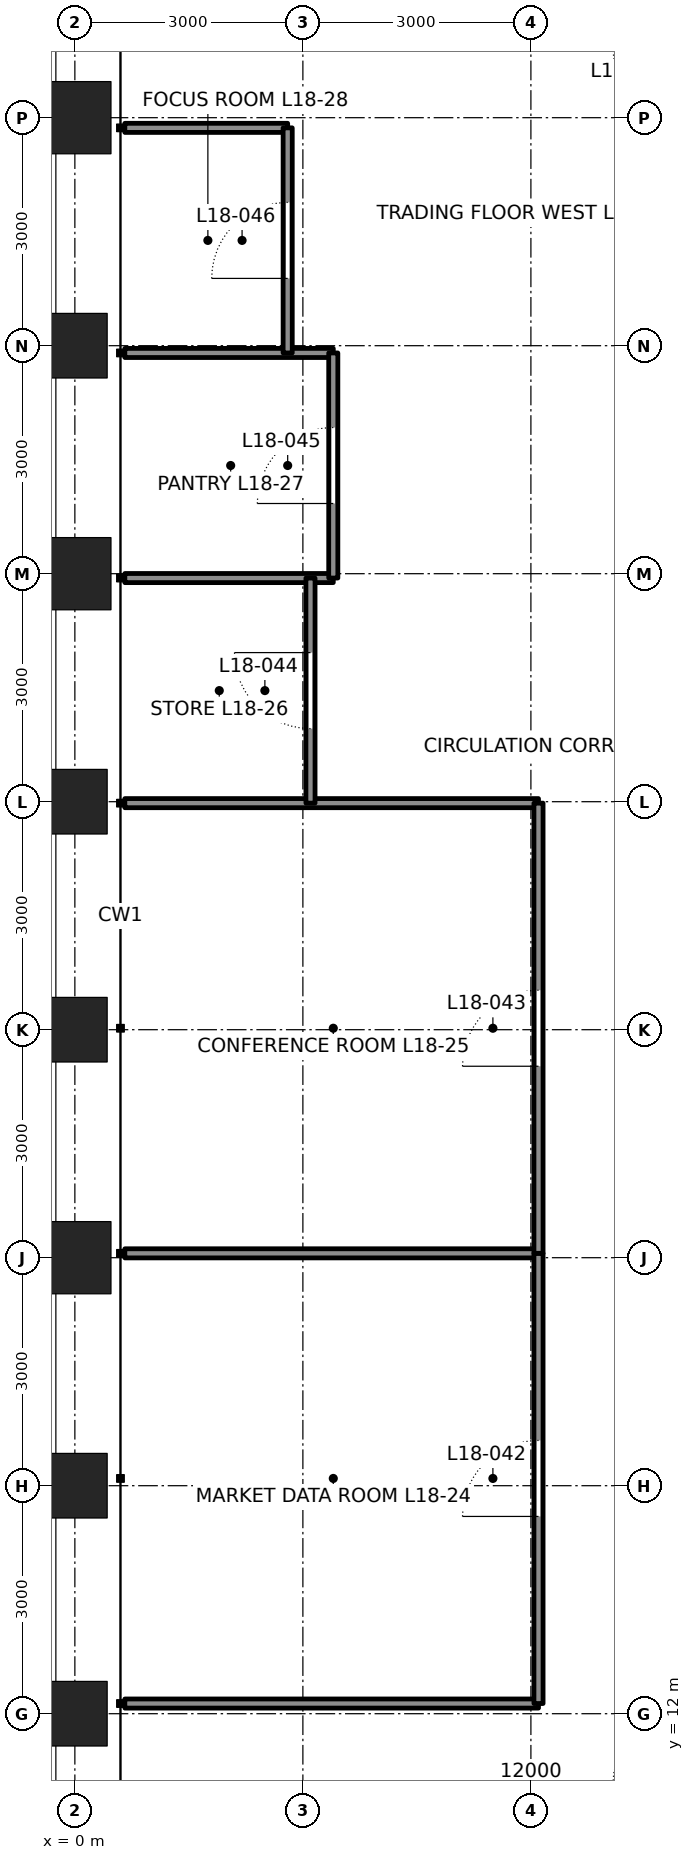
"""IFC4 building model, lengths in metres.
Left out: names, types, materials, properties, quantities, classifications, styles, units other than length and angle.
Written with IfcOpenShell. Run it as: python <this file> out.ifc"""

import sys

from ifc_helpers import new_model, si_unit, direction, frame, frame_2d, origin, origin_2d, place, context, subcontext, project, spatial, rectangle, hollow_rectangle, extrude, element, fill, save


model = new_model("IFC4")
c1 = context("Model", 3, precision=1e-05, world=origin(), true_north=direction((0.0, 1.0)))
c2 = subcontext(c1, "Body", "Model", "MODEL_VIEW")
j1 = project(units=[si_unit("LENGTHUNIT", "METRE"), si_unit("PLANEANGLEUNIT", "RADIAN")], contexts=[c1])
p1 = place(None, origin())
s1 = spatial("IfcSite", under=j1, at=p1, CompositionType="ELEMENT")
p2 = place(p1, origin())
s2 = spatial("IfcBuilding", under=s1, at=p2, CompositionType="ELEMENT")
p3 = place(p2, frame((0.0, 0.0, 87.3)))
s3 = spatial("IfcBuildingStorey", under=s2, at=p3, CompositionType="ELEMENT", Elevation=87.3)
p4 = place(p3, frame((0.0, 33.0, 0.0), z_axis=(0.0, 0.0, 1.0), x_axis=(-1.0, 0.0, 0.0)))
e1 = element("IfcColumn", 1, at=p4, inside=s3, PredefinedType="COLUMN", context=c2, shape_type="SweptSolid", body=[
    extrude(hollow_rectangle(XDim=0.95, YDim=0.95, WallThickness=0.11, at=origin_2d()), origin(), (0.0, 0.0, 1.0), 4.5),
])
p5 = place(p3, frame((0.0, 30.0, 0.0), z_axis=(0.0, 0.0, 1.0), x_axis=(-1.0, 0.0, 0.0)))
e2 = element("IfcColumn", 2, at=p5, inside=s3, PredefinedType="COLUMN", context=c2, shape_type="SweptSolid", body=[
    extrude(hollow_rectangle(XDim=0.85, YDim=0.85, WallThickness=0.085, at=origin_2d()), origin(), (0.0, 0.0, 1.0), 4.5),
])
p6 = place(p3, frame((0.0, 27.0, 0.0), z_axis=(0.0, 0.0, 1.0), x_axis=(-1.0, 0.0, 0.0)))
e3 = element("IfcColumn", 3, at=p6, inside=s3, PredefinedType="COLUMN", context=c2, shape_type="SweptSolid", body=[
    extrude(hollow_rectangle(XDim=0.95, YDim=0.95, WallThickness=0.11, at=origin_2d()), origin(), (0.0, 0.0, 1.0), 4.5),
])
for number, where, z_axis, x_axis in (
    (4, (0.0, 24.0, 0.0), (0.0, 0.0, 1.0), (-1.0, 0.0, 0.0)),
    (5, (0.0, 21.0, 0.0), (0.0, 0.0, 1.0), (-1.0, 0.0, 0.0)),
):
    element("IfcColumn", number, at=place(p3, frame(where, z_axis=z_axis, x_axis=x_axis)), inside=s3, PredefinedType="COLUMN", context=c2, shape_type="SweptSolid", body=[
        extrude(hollow_rectangle(XDim=0.85, YDim=0.85, WallThickness=0.085, at=origin_2d()), origin(), (0.0, 0.0, 1.0), 4.5),
    ])
p7 = place(p3, frame((0.0, 18.0, 0.0), z_axis=(0.0, 0.0, 1.0), x_axis=(-1.0, 0.0, 0.0)))
e6 = element("IfcColumn", 6, at=p7, inside=s3, PredefinedType="COLUMN", context=c2, shape_type="SweptSolid", body=[
    extrude(hollow_rectangle(XDim=0.95, YDim=0.95, WallThickness=0.11, at=origin_2d()), origin(), (0.0, 0.0, 1.0), 4.5),
])
for number, where, z_axis, x_axis in (
    (7, (0.0, 15.0, 0.0), (0.0, 0.0, 1.0), (-1.0, 0.0, 0.0)),
    (8, (0.0, 12.0, 0.0), (0.0, 0.0, 1.0), (-1.0, 0.0, 0.0)),
):
    element("IfcColumn", number, at=place(p3, frame(where, z_axis=z_axis, x_axis=x_axis)), inside=s3, PredefinedType="COLUMN", context=c2, shape_type="SweptSolid", body=[
        extrude(hollow_rectangle(XDim=0.85, YDim=0.85, WallThickness=0.085, at=origin_2d()), origin(), (0.0, 0.0, 1.0), 4.5),
    ])
p8 = place(p3, frame((0.657, 12.134, -0.3), z_axis=(0.0, 0.0, 1.0), x_axis=(1.0, 0.0, 0.0)))
e9 = element("IfcWall", 9, at=p8, inside=s3, PredefinedType="PARTITIONING", context=c2, shape_type="SweptSolid", body=[
    extrude(rectangle(XDim=5.443, YDim=0.12, at=frame_2d((2.721, 0.0))), origin(), (0.0, 0.0, 1.0), 3.481),
])
for number, where, z_axis, x_axis in (
    (10, (0.657, 18.057, -0.3), (0.0, 0.0, 1.0), (1.0, 0.0, 0.0)),
    (11, (0.657, 23.981, -0.3), (0.0, 0.0, 1.0), (1.0, 0.0, 0.0)),
):
    element("IfcWall", number, at=place(p3, frame(where, z_axis=z_axis, x_axis=x_axis)), inside=s3, PredefinedType="PARTITIONING", context=c2, shape_type="SweptSolid", body=[
        extrude(rectangle(XDim=5.443, YDim=0.12, at=frame_2d((2.721, 0.0))), origin(), (0.0, 0.0, 1.0), 3.646),
    ])
for number, where, z_axis, x_axis in (
    (12, (0.657, 26.943, -0.3), (0.0, 0.0, 1.0), (1.0, 0.0, 0.0)),
    (13, (0.657, 29.904, -0.3), (0.0, 0.0, 1.0), (1.0, 0.0, 0.0)),
):
    element("IfcWall", number, at=place(p3, frame(where, z_axis=z_axis, x_axis=x_axis)), inside=s3, PredefinedType="PARTITIONING", context=c2, shape_type="SweptSolid", body=[
        extrude(rectangle(XDim=2.742, YDim=0.12, at=frame_2d((1.371, 0.0))), origin(), (0.0, 0.0, 1.0), 3.646),
    ])
p9 = place(p3, frame((0.657, 32.866, -0.3), z_axis=(0.0, 0.0, 1.0), x_axis=(1.0, 0.0, 0.0)))
e14 = element("IfcWall", 14, at=p9, inside=s3, PredefinedType="PARTITIONING", context=c2, shape_type="SweptSolid", body=[
    extrude(rectangle(XDim=2.143, YDim=0.12, at=frame_2d((1.071, 0.0))), origin(), (0.0, 0.0, 1.0), 3.481),
])
p10 = place(p3, frame((6.1, 12.134, -0.3), z_axis=(0.0, 0.0, 1.0), x_axis=(0.0, 1.0, 0.0)))
e15 = element("IfcWall", 15, at=p10, inside=s3, PredefinedType="PARTITIONING", context=c2, shape_type="SweptSolid", body=[
    extrude(rectangle(XDim=5.924, YDim=0.12, at=frame_2d((2.962, 0.0))), origin(), (0.0, 0.0, 1.0), 4.34),
])
p11 = place(p10, frame((2.462, 0.0, 0.3)))
e16 = element("IfcOpeningElement", 16, at=p11, cuts=e15, PredefinedType="OPENING", context=c2, shape_type="SweptSolid", body=[
    extrude(rectangle(XDim=1.0, YDim=2.4, at=frame_2d((0.5, 1.2))), frame((0.0, 0.07, 0.0), z_axis=(0.0, -1.0, 0.0), x_axis=(1.0, 0.0, 0.0)), (0.0, 0.0, 1.0), 0.14),
])
p12 = place(p3, frame((6.1, 18.057, -0.3), z_axis=(0.0, 0.0, 1.0), x_axis=(0.0, 1.0, 0.0)))
e17 = element("IfcWall", 17, at=p12, inside=s3, PredefinedType="PARTITIONING", context=c2, shape_type="SweptSolid", body=[
    extrude(rectangle(XDim=5.924, YDim=0.12, at=frame_2d((2.962, 0.0))), origin(), (0.0, 0.0, 1.0), 4.34),
])
p13 = place(p12, frame((2.462, 0.0, 0.3)))
e18 = element("IfcOpeningElement", 18, at=p13, cuts=e17, PredefinedType="OPENING", context=c2, shape_type="SweptSolid", body=[
    extrude(rectangle(XDim=1.0, YDim=2.4, at=frame_2d((0.5, 1.2))), frame((0.0, 0.07, 0.0), z_axis=(0.0, -1.0, 0.0), x_axis=(1.0, 0.0, 0.0)), (0.0, 0.0, 1.0), 0.14),
])
p14 = place(p3, frame((3.1, 23.981, -0.3), z_axis=(0.0, 0.0, 1.0), x_axis=(0.0, 1.0, 0.0)))
e19 = element("IfcWall", 19, at=p14, inside=s3, PredefinedType="PARTITIONING", context=c2, shape_type="SweptSolid", body=[
    extrude(rectangle(XDim=2.962, YDim=0.12, at=frame_2d((1.481, 0.0))), origin(), (0.0, 0.0, 1.0), 4.34),
])
p15 = place(p14, frame((0.981, 0.0, 0.3)))
e20 = element("IfcOpeningElement", 20, at=p15, cuts=e19, PredefinedType="OPENING", context=c2, shape_type="SweptSolid", body=[
    extrude(rectangle(XDim=1.0, YDim=2.4, at=frame_2d((0.5, 1.2))), frame((0.0, 0.07, 0.0), z_axis=(0.0, -1.0, 0.0), x_axis=(1.0, 0.0, 0.0)), (0.0, 0.0, 1.0), 0.14),
])
p16 = place(p3, frame((3.4, 26.943, -0.3), z_axis=(0.0, 0.0, 1.0), x_axis=(0.0, 1.0, 0.0)))
e21 = element("IfcWall", 21, at=p16, inside=s3, PredefinedType="PARTITIONING", context=c2, shape_type="SweptSolid", body=[
    extrude(rectangle(XDim=2.962, YDim=0.12, at=frame_2d((1.481, 0.0))), origin(), (0.0, 0.0, 1.0), 4.34),
])
p17 = place(p16, frame((0.981, 0.0, 0.3)))
e22 = element("IfcOpeningElement", 22, at=p17, cuts=e21, PredefinedType="OPENING", context=c2, shape_type="SweptSolid", body=[
    extrude(rectangle(XDim=1.0, YDim=2.4, at=frame_2d((0.5, 1.2))), frame((0.0, 0.07, 0.0), z_axis=(0.0, -1.0, 0.0), x_axis=(1.0, 0.0, 0.0)), (0.0, 0.0, 1.0), 0.14),
])
p18 = place(p3, frame((2.8, 29.904, -0.3), z_axis=(0.0, 0.0, 1.0), x_axis=(0.0, 1.0, 0.0)))
e23 = element("IfcWall", 23, at=p18, inside=s3, PredefinedType="PARTITIONING", context=c2, shape_type="SweptSolid", body=[
    extrude(rectangle(XDim=2.962, YDim=0.12, at=frame_2d((1.481, 0.0))), origin(), (0.0, 0.0, 1.0), 4.34),
])
p19 = place(p18, frame((0.981, 0.0, 0.3)))
e24 = element("IfcOpeningElement", 24, at=p19, cuts=e23, PredefinedType="OPENING", context=c2, shape_type="SweptSolid", body=[
    extrude(rectangle(XDim=1.0, YDim=2.4, at=frame_2d((0.5, 1.2))), frame((0.0, 0.07, 0.0), z_axis=(0.0, -1.0, 0.0), x_axis=(1.0, 0.0, 0.0)), (0.0, 0.0, 1.0), 0.14),
])
p20 = place(p3, frame((9.0, 33.0, -0.3), z_axis=(0.0, 0.0, 1.0), x_axis=(-0.707106781187, 0.707106781187, 0.0)))
e25 = element("IfcWall", 25, at=p20, inside=s3, PredefinedType="PARTITIONING", context=c2, shape_type="SweptSolid", body=[
    extrude(rectangle(XDim=11.842, YDim=0.12, at=frame_2d((5.921, 0.0))), origin(), (0.0, 0.0, 1.0), 4.34),
])
p21 = place(p20, frame((1.3, 0.0, 0.3)))
e26 = element("IfcOpeningElement", 26, at=p21, cuts=e25, PredefinedType="OPENING", context=c2, shape_type="SweptSolid", body=[
    extrude(rectangle(XDim=1.0, YDim=2.4, at=frame_2d((0.5, 1.2))), frame((0.0, 0.07, 0.0), z_axis=(0.0, -1.0, 0.0), x_axis=(1.0, 0.0, 0.0)), (0.0, 0.0, 1.0), 0.14),
])
p22 = place(p3, frame((9.0, 12.0, -0.3), z_axis=(0.0, 0.0, 1.0), x_axis=(-0.707106781187, -0.707106781187, 0.0)))
e27 = element("IfcWall", 27, at=p22, inside=s3, PredefinedType="PARTITIONING", context=c2, shape_type="SweptSolid", body=[
    extrude(rectangle(XDim=11.842, YDim=0.12, at=frame_2d((5.921, 0.0))), origin(), (0.0, 0.0, 1.0), 4.34),
])
p23 = place(p22, frame((1.3, 0.0, 0.3)))
e28 = element("IfcOpeningElement", 28, at=p23, cuts=e27, PredefinedType="OPENING", context=c2, shape_type="SweptSolid", body=[
    extrude(rectangle(XDim=1.0, YDim=2.4, at=frame_2d((0.5, 1.2))), frame((0.0, 0.07, 0.0), z_axis=(0.0, -1.0, 0.0), x_axis=(1.0, 0.0, 0.0)), (0.0, 0.0, 1.0), 0.14),
])
p24 = place(p11, origin())
e29 = element("IfcDoor", 29, at=p24, inside=s3, OperationType="SINGLE_SWING_LEFT", PredefinedType="DOOR", context=c2, shape_type="SweptSolid", body=[
    extrude(rectangle(XDim=1.0, YDim=2.4, at=frame_2d((0.5, 1.2))), frame((0.0, 0.025, 0.0), z_axis=(0.0, -1.0, 0.0), x_axis=(1.0, 0.0, 0.0)), (0.0, 0.0, 1.0), 0.05),
])
fill(e16, e29)
p25 = place(p13, origin())
e30 = element("IfcDoor", 30, at=p25, inside=s3, OperationType="SINGLE_SWING_LEFT", PredefinedType="DOOR", context=c2, shape_type="SweptSolid", body=[
    extrude(rectangle(XDim=1.0, YDim=2.4, at=frame_2d((0.5, 1.2))), frame((0.0, 0.025, 0.0), z_axis=(0.0, -1.0, 0.0), x_axis=(1.0, 0.0, 0.0)), (0.0, 0.0, 1.0), 0.05),
])
fill(e18, e30)
p26 = place(p15, origin())
e31 = element("IfcDoor", 31, at=p26, inside=s3, OperationType="SINGLE_SWING_RIGHT", PredefinedType="DOOR", context=c2, shape_type="SweptSolid", body=[
    extrude(rectangle(XDim=1.0, YDim=2.4, at=frame_2d((0.5, 1.2))), frame((0.0, 0.025, 0.0), z_axis=(0.0, -1.0, 0.0), x_axis=(1.0, 0.0, 0.0)), (0.0, 0.0, 1.0), 0.05),
])
fill(e20, e31)
p27 = place(p17, origin())
e32 = element("IfcDoor", 32, at=p27, inside=s3, OperationType="SINGLE_SWING_LEFT", PredefinedType="DOOR", context=c2, shape_type="SweptSolid", body=[
    extrude(rectangle(XDim=1.0, YDim=2.4, at=frame_2d((0.5, 1.2))), frame((0.0, 0.025, 0.0), z_axis=(0.0, -1.0, 0.0), x_axis=(1.0, 0.0, 0.0)), (0.0, 0.0, 1.0), 0.05),
])
fill(e22, e32)
p28 = place(p19, origin())
e33 = element("IfcDoor", 33, at=p28, inside=s3, OperationType="SINGLE_SWING_LEFT", PredefinedType="DOOR", context=c2, shape_type="SweptSolid", body=[
    extrude(rectangle(XDim=1.0, YDim=2.4, at=frame_2d((0.5, 1.2))), frame((0.0, 0.025, 0.0), z_axis=(0.0, -1.0, 0.0), x_axis=(1.0, 0.0, 0.0)), (0.0, 0.0, 1.0), 0.05),
])
fill(e24, e33)
save(model, sys.argv[1])
